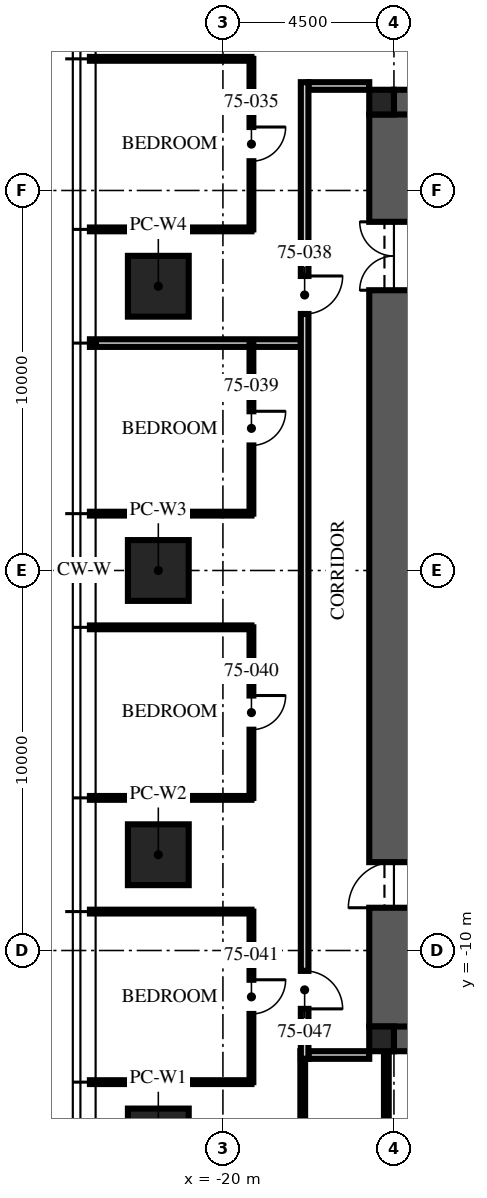
"""IFC4 building model, lengths in metres.
Left out: names, types, materials, properties, quantities, classifications, styles, units other than length and angle.
Written with IfcOpenShell. Run it as: python <this file> out.ifc"""

import sys

from ifc_helpers import new_model, si_unit, direction, frame, frame_2d, origin, origin_2d, place, context, subcontext, project, spatial, rectangle, extrude, element, fill, save


model = new_model("IFC4")
c1 = context("Model", 3, precision=1e-05, world=origin(), true_north=direction((0.0, 1.0)))
c2 = subcontext(c1, "Body", "Model", "MODEL_VIEW")
j1 = project(units=[si_unit("LENGTHUNIT", "METRE"), si_unit("PLANEANGLEUNIT", "RADIAN")], contexts=[c1])
p1 = place(None, origin())
s1 = spatial("IfcSite", under=j1, at=p1, CompositionType="ELEMENT")
p2 = place(p1, origin())
s2 = spatial("IfcBuilding", under=s1, at=p2, CompositionType="ELEMENT")
p3 = place(p2, frame((0.0, 0.0, 300.75)))
s3 = spatial("IfcBuildingStorey", under=s2, at=p3, CompositionType="ELEMENT", Elevation=300.75)
for number, where, z_axis, x_axis in (
    (1, (-15.5, 12.0, -0.25), (0.0, 0.0, 1.0), (1.0, 0.0, 0.0)),
    (2, (-15.5, -12.0, -0.25), (0.0, 0.0, 1.0), (1.0, 0.0, 0.0)),
):
    element("IfcWall", number, at=place(p3, frame(where, z_axis=z_axis, x_axis=x_axis)), inside=s3, PredefinedType="SHEAR", context=c2, shape_type="SweptSolid", body=[
        extrude(rectangle(XDim=31.0, YDim=1.3, at=frame_2d((15.5, 0.0))), origin(), (0.0, 0.0, 1.0), 3.75),
    ])
p4 = place(p3, frame((-15.5, -12.0, -0.25), z_axis=(0.0, 0.0, 1.0), x_axis=(0.0, 1.0, 0.0)))
e3 = element("IfcWall", 3, at=p4, inside=s3, PredefinedType="SHEAR", context=c2, shape_type="SweptSolid", body=[
    extrude(rectangle(XDim=24.0, YDim=1.3, at=frame_2d((12.0, 0.0))), origin(), (0.0, 0.0, 1.0), 3.75),
])
p5 = place(p4, frame((3.125, 0.0, 0.25)))
e4 = element("IfcOpeningElement", 4, at=p5, cuts=e3, PredefinedType="OPENING", context=c2, shape_type="SweptSolid", body=[
    extrude(rectangle(XDim=1.2, YDim=2.1, at=frame_2d((0.6, 1.05))), frame((0.0, 0.66, 0.0), z_axis=(0.0, -1.0, 0.0), x_axis=(1.0, 0.0, 0.0)), (0.0, 0.0, 1.0), 1.32),
])
p6 = place(p4, frame((19.375, 0.0, 0.25)))
e5 = element("IfcOpeningElement", 5, at=p6, cuts=e3, PredefinedType="OPENING", context=c2, shape_type="SweptSolid", body=[
    extrude(rectangle(XDim=1.8, YDim=2.1, at=frame_2d((0.9, 1.05))), frame((0.0, 0.66, 0.0), z_axis=(0.0, -1.0, 0.0), x_axis=(1.0, 0.0, 0.0)), (0.0, 0.0, 1.0), 1.32),
])
for number, where, z_axis, x_axis in (
    (6, (-15.825, 12.325, -0.25), (0.0, 0.0, 1.0), (1.0, 0.0, 0.0)),
    (7, (-15.825, -12.325, -0.25), (0.0, 0.0, 1.0), (1.0, 0.0, 0.0)),
):
    element("IfcColumn", number, at=place(p3, frame(where, z_axis=z_axis, x_axis=x_axis)), inside=s3, PredefinedType="COLUMN", context=c2, shape_type="SweptSolid", body=[
        extrude(rectangle(XDim=0.65, YDim=0.65, at=origin_2d()), origin(), (0.0, 0.0, 1.0), 3.75),
    ])
for number, where, z_axis, x_axis in (
    (8, (-21.7, -14.96, 0.0), (0.0, 0.0, 1.0), (0.0, 1.0, 0.0)),
    (9, (-21.7, -7.48, 0.0), (0.0, 0.0, 1.0), (0.0, 1.0, 0.0)),
    (10, (-21.7, 0.0, 0.0), (0.0, 0.0, 1.0), (0.0, 1.0, 0.0)),
    (11, (-21.7, 7.48, 0.0), (0.0, 0.0, 1.0), (0.0, 1.0, 0.0)),
):
    element("IfcColumn", number, at=place(p3, frame(where, z_axis=z_axis, x_axis=x_axis)), inside=s3, PredefinedType="COLUMN", context=c2, shape_type="SweptSolid", body=[
        extrude(rectangle(XDim=1.6, YDim=1.6, at=origin_2d()), origin(), (0.0, 0.0, 1.0), 3.75),
    ])
for number, where, z_axis, x_axis in (
    (12, (-16.15, 12.75, 0.0), (0.0, 0.0, 1.0), (-1.0, 0.0, 0.0)),
    (13, (-16.15, -12.75, 0.0), (0.0, 0.0, 1.0), (-1.0, 0.0, 0.0)),
):
    element("IfcWall", number, at=place(p3, frame(where, z_axis=z_axis, x_axis=x_axis)), inside=s3, PredefinedType="PARTITIONING", context=c2, shape_type="SweptSolid", body=[
        extrude(rectangle(XDim=1.6, YDim=0.2, at=frame_2d((0.8, 0.0))), origin(), (0.0, 0.0, 1.0), 2.6),
    ])
for number, where, z_axis, x_axis in (
    (14, (-19.25, 13.464, 0.0), (0.0, 0.0, 1.0), (-1.0, 0.0, 0.0)),
    (15, (-19.25, 8.976, 0.0), (0.0, 0.0, 1.0), (-1.0, 0.0, 0.0)),
):
    element("IfcWall", number, at=place(p3, frame(where, z_axis=z_axis, x_axis=x_axis)), inside=s3, PredefinedType="PARTITIONING", context=c2, shape_type="SweptSolid", body=[
        extrude(rectangle(XDim=4.25, YDim=0.1, at=frame_2d((2.125, 0.0))), origin(), (0.0, 0.0, 1.0), 3.01),
    ])
p7 = place(p3, frame((-17.95, 5.984, 0.0), z_axis=(0.0, 0.0, 1.0), x_axis=(-1.0, 0.0, 0.0)))
e16 = element("IfcWall", 16, at=p7, inside=s3, PredefinedType="PARTITIONING", context=c2, shape_type="SweptSolid", body=[
    extrude(rectangle(XDim=5.55, YDim=0.2, at=frame_2d((2.775, 0.0))), origin(), (0.0, 0.0, 1.0), 3.01),
])
for number, where, z_axis, x_axis in (
    (17, (-19.25, 1.496, 0.0), (0.0, 0.0, 1.0), (-1.0, 0.0, 0.0)),
    (18, (-19.25, -1.496, 0.0), (0.0, 0.0, 1.0), (-1.0, 0.0, 0.0)),
    (19, (-19.25, -5.984, 0.0), (0.0, 0.0, 1.0), (-1.0, 0.0, 0.0)),
    (20, (-19.25, -8.976, 0.0), (0.0, 0.0, 1.0), (-1.0, 0.0, 0.0)),
    (21, (-19.25, -13.464, 0.0), (0.0, 0.0, 1.0), (-1.0, 0.0, 0.0)),
):
    element("IfcWall", number, at=place(p3, frame(where, z_axis=z_axis, x_axis=x_axis)), inside=s3, PredefinedType="PARTITIONING", context=c2, shape_type="SweptSolid", body=[
        extrude(rectangle(XDim=4.25, YDim=0.1, at=frame_2d((2.125, 0.0))), origin(), (0.0, 0.0, 1.0), 3.01),
    ])
p8 = place(p3, frame((-19.25, 13.464, 0.0), z_axis=(0.0, 0.0, 1.0), x_axis=(0.0, -1.0, 0.0)))
e22 = element("IfcWall", 22, at=p8, inside=s3, PredefinedType="PARTITIONING", context=c2, shape_type="SweptSolid", body=[
    extrude(rectangle(XDim=4.488, YDim=0.1, at=frame_2d((2.244, 0.0))), origin(), (0.0, 0.0, 1.0), 2.91),
])
p9 = place(p8, frame((1.794, 0.0, 0.0)))
e23 = element("IfcOpeningElement", 23, at=p9, cuts=e22, PredefinedType="OPENING", context=c2, shape_type="SweptSolid", body=[
    extrude(rectangle(XDim=0.9, YDim=2.1, at=frame_2d((0.45, 1.05))), frame((0.0, 0.06, 0.0), z_axis=(0.0, -1.0, 0.0), x_axis=(1.0, 0.0, 0.0)), (0.0, 0.0, 1.0), 0.12),
])
p10 = place(p3, frame((-19.25, 5.984, 0.0), z_axis=(0.0, 0.0, 1.0), x_axis=(0.0, -1.0, 0.0)))
e24 = element("IfcWall", 24, at=p10, inside=s3, PredefinedType="PARTITIONING", context=c2, shape_type="SweptSolid", body=[
    extrude(rectangle(XDim=4.488, YDim=0.1, at=frame_2d((2.244, 0.0))), origin(), (0.0, 0.0, 1.0), 2.91),
])
p11 = place(p10, frame((1.794, 0.0, 0.0)))
e25 = element("IfcOpeningElement", 25, at=p11, cuts=e24, PredefinedType="OPENING", context=c2, shape_type="SweptSolid", body=[
    extrude(rectangle(XDim=0.9, YDim=2.1, at=frame_2d((0.45, 1.05))), frame((0.0, 0.06, 0.0), z_axis=(0.0, -1.0, 0.0), x_axis=(1.0, 0.0, 0.0)), (0.0, 0.0, 1.0), 0.12),
])
p12 = place(p3, frame((-19.25, -1.496, 0.0), z_axis=(0.0, 0.0, 1.0), x_axis=(0.0, -1.0, 0.0)))
e26 = element("IfcWall", 26, at=p12, inside=s3, PredefinedType="PARTITIONING", context=c2, shape_type="SweptSolid", body=[
    extrude(rectangle(XDim=4.488, YDim=0.1, at=frame_2d((2.244, 0.0))), origin(), (0.0, 0.0, 1.0), 2.91),
])
p13 = place(p12, frame((1.794, 0.0, 0.0)))
e27 = element("IfcOpeningElement", 27, at=p13, cuts=e26, PredefinedType="OPENING", context=c2, shape_type="SweptSolid", body=[
    extrude(rectangle(XDim=0.9, YDim=2.1, at=frame_2d((0.45, 1.05))), frame((0.0, 0.06, 0.0), z_axis=(0.0, -1.0, 0.0), x_axis=(1.0, 0.0, 0.0)), (0.0, 0.0, 1.0), 0.12),
])
p14 = place(p3, frame((-19.25, -8.976, 0.0), z_axis=(0.0, 0.0, 1.0), x_axis=(0.0, -1.0, 0.0)))
e28 = element("IfcWall", 28, at=p14, inside=s3, PredefinedType="PARTITIONING", context=c2, shape_type="SweptSolid", body=[
    extrude(rectangle(XDim=4.488, YDim=0.1, at=frame_2d((2.244, 0.0))), origin(), (0.0, 0.0, 1.0), 2.91),
])
p15 = place(p14, frame((1.794, 0.0, 0.0)))
e29 = element("IfcOpeningElement", 29, at=p15, cuts=e28, PredefinedType="OPENING", context=c2, shape_type="SweptSolid", body=[
    extrude(rectangle(XDim=0.9, YDim=2.1, at=frame_2d((0.45, 1.05))), frame((0.0, 0.06, 0.0), z_axis=(0.0, -1.0, 0.0), x_axis=(1.0, 0.0, 0.0)), (0.0, 0.0, 1.0), 0.12),
])
for number, where, z_axis, x_axis in (
    (30, (-17.9, -12.65, 0.0), (0.0, 0.0, 1.0), (0.0, -1.0, 0.0)),
    (31, (-15.7, -12.65, 0.0), (0.0, 0.0, 1.0), (0.0, -1.0, 0.0)),
):
    element("IfcWall", number, at=place(p3, frame(where, z_axis=z_axis, x_axis=x_axis)), inside=s3, PredefinedType="PARTITIONING", context=c2, shape_type="SweptSolid", body=[
        extrude(rectangle(XDim=4.096, YDim=0.125, at=frame_2d((2.048, 0.0))), origin(), (0.0, 0.0, 1.0), 2.6),
    ])
p16 = place(p3, frame((-17.85, 12.85, 0.0), z_axis=(0.0, 0.0, 1.0), x_axis=(0.0, -1.0, 0.0)))
e32 = element("IfcWall", 32, at=p16, inside=s3, PredefinedType="PARTITIONING", context=c2, shape_type="SweptSolid", body=[
    extrude(rectangle(XDim=25.7, YDim=0.2, at=frame_2d((12.85, 0.0))), origin(), (0.0, 0.0, 1.0), 2.9),
])
p17 = place(p16, frame((5.1, 0.0, 0.0)))
e33 = element("IfcOpeningElement", 33, at=p17, cuts=e32, PredefinedType="OPENING", context=c2, shape_type="SweptSolid", body=[
    extrude(rectangle(XDim=1.0, YDim=2.2, at=frame_2d((0.5, 1.1))), frame((0.0, 0.11, 0.0), z_axis=(0.0, -1.0, 0.0), x_axis=(1.0, 0.0, 0.0)), (0.0, 0.0, 1.0), 0.22),
])
p18 = place(p16, frame((23.386, 0.0, 0.0)))
e34 = element("IfcOpeningElement", 34, at=p18, cuts=e32, PredefinedType="OPENING", context=c2, shape_type="SweptSolid", body=[
    extrude(rectangle(XDim=1.0, YDim=2.2, at=frame_2d((0.5, 1.1))), frame((0.0, 0.11, 0.0), z_axis=(0.0, -1.0, 0.0), x_axis=(1.0, 0.0, 0.0)), (0.0, 0.0, 1.0), 0.22),
])
p19 = place(p5, origin())
e35 = element("IfcDoor", 35, at=p19, inside=s3, OperationType="SINGLE_SWING_LEFT", PredefinedType="DOOR", context=c2, shape_type="SweptSolid", body=[
    extrude(rectangle(XDim=1.2, YDim=2.1, at=frame_2d((0.6, 1.05))), frame((0.0, 0.025, 0.0), z_axis=(0.0, -1.0, 0.0), x_axis=(1.0, 0.0, 0.0)), (0.0, 0.0, 1.0), 0.05),
])
fill(e4, e35)
p20 = place(p6, origin())
e36 = element("IfcDoor", 36, at=p20, inside=s3, OperationType="DOUBLE_DOOR_SINGLE_SWING", PredefinedType="DOOR", context=c2, shape_type="SweptSolid", body=[
    extrude(rectangle(XDim=1.8, YDim=2.1, at=frame_2d((0.9, 1.05))), frame((0.0, 0.025, 0.0), z_axis=(0.0, -1.0, 0.0), x_axis=(1.0, 0.0, 0.0)), (0.0, 0.0, 1.0), 0.05),
])
fill(e5, e36)
p21 = place(p9, origin())
e37 = element("IfcDoor", 37, at=p21, inside=s3, OperationType="SINGLE_SWING_LEFT", PredefinedType="DOOR", context=c2, shape_type="SweptSolid", body=[
    extrude(rectangle(XDim=0.9, YDim=2.1, at=frame_2d((0.45, 1.05))), frame((0.0, 0.025, 0.0), z_axis=(0.0, -1.0, 0.0), x_axis=(1.0, 0.0, 0.0)), (0.0, 0.0, 1.0), 0.05),
])
fill(e23, e37)
p22 = place(p17, origin())
e38 = element("IfcDoor", 38, at=p22, inside=s3, OperationType="SINGLE_SWING_LEFT", PredefinedType="DOOR", context=c2, shape_type="SweptSolid", body=[
    extrude(rectangle(XDim=1.0, YDim=2.2, at=frame_2d((0.5, 1.1))), frame((0.0, 0.025, 0.0), z_axis=(0.0, -1.0, 0.0), x_axis=(1.0, 0.0, 0.0)), (0.0, 0.0, 1.0), 0.05),
])
fill(e33, e38)
p23 = place(p11, origin())
e39 = element("IfcDoor", 39, at=p23, inside=s3, OperationType="SINGLE_SWING_LEFT", PredefinedType="DOOR", context=c2, shape_type="SweptSolid", body=[
    extrude(rectangle(XDim=0.9, YDim=2.1, at=frame_2d((0.45, 1.05))), frame((0.0, 0.025, 0.0), z_axis=(0.0, -1.0, 0.0), x_axis=(1.0, 0.0, 0.0)), (0.0, 0.0, 1.0), 0.05),
])
fill(e25, e39)
p24 = place(p13, origin())
e40 = element("IfcDoor", 40, at=p24, inside=s3, OperationType="SINGLE_SWING_LEFT", PredefinedType="DOOR", context=c2, shape_type="SweptSolid", body=[
    extrude(rectangle(XDim=0.9, YDim=2.1, at=frame_2d((0.45, 1.05))), frame((0.0, 0.025, 0.0), z_axis=(0.0, -1.0, 0.0), x_axis=(1.0, 0.0, 0.0)), (0.0, 0.0, 1.0), 0.05),
])
fill(e27, e40)
p25 = place(p15, origin())
e41 = element("IfcDoor", 41, at=p25, inside=s3, OperationType="SINGLE_SWING_LEFT", PredefinedType="DOOR", context=c2, shape_type="SweptSolid", body=[
    extrude(rectangle(XDim=0.9, YDim=2.1, at=frame_2d((0.45, 1.05))), frame((0.0, 0.025, 0.0), z_axis=(0.0, -1.0, 0.0), x_axis=(1.0, 0.0, 0.0)), (0.0, 0.0, 1.0), 0.05),
])
fill(e29, e41)
p26 = place(p18, origin())
e42 = element("IfcDoor", 42, at=p26, inside=s3, OperationType="SINGLE_SWING_RIGHT", PredefinedType="DOOR", context=c2, shape_type="SweptSolid", body=[
    extrude(rectangle(XDim=1.0, YDim=2.2, at=frame_2d((0.5, 1.1))), frame((0.0, 0.025, 0.0), z_axis=(0.0, -1.0, 0.0), x_axis=(1.0, 0.0, 0.0)), (0.0, 0.0, 1.0), 0.05),
])
fill(e34, e42)
save(model, sys.argv[1])
